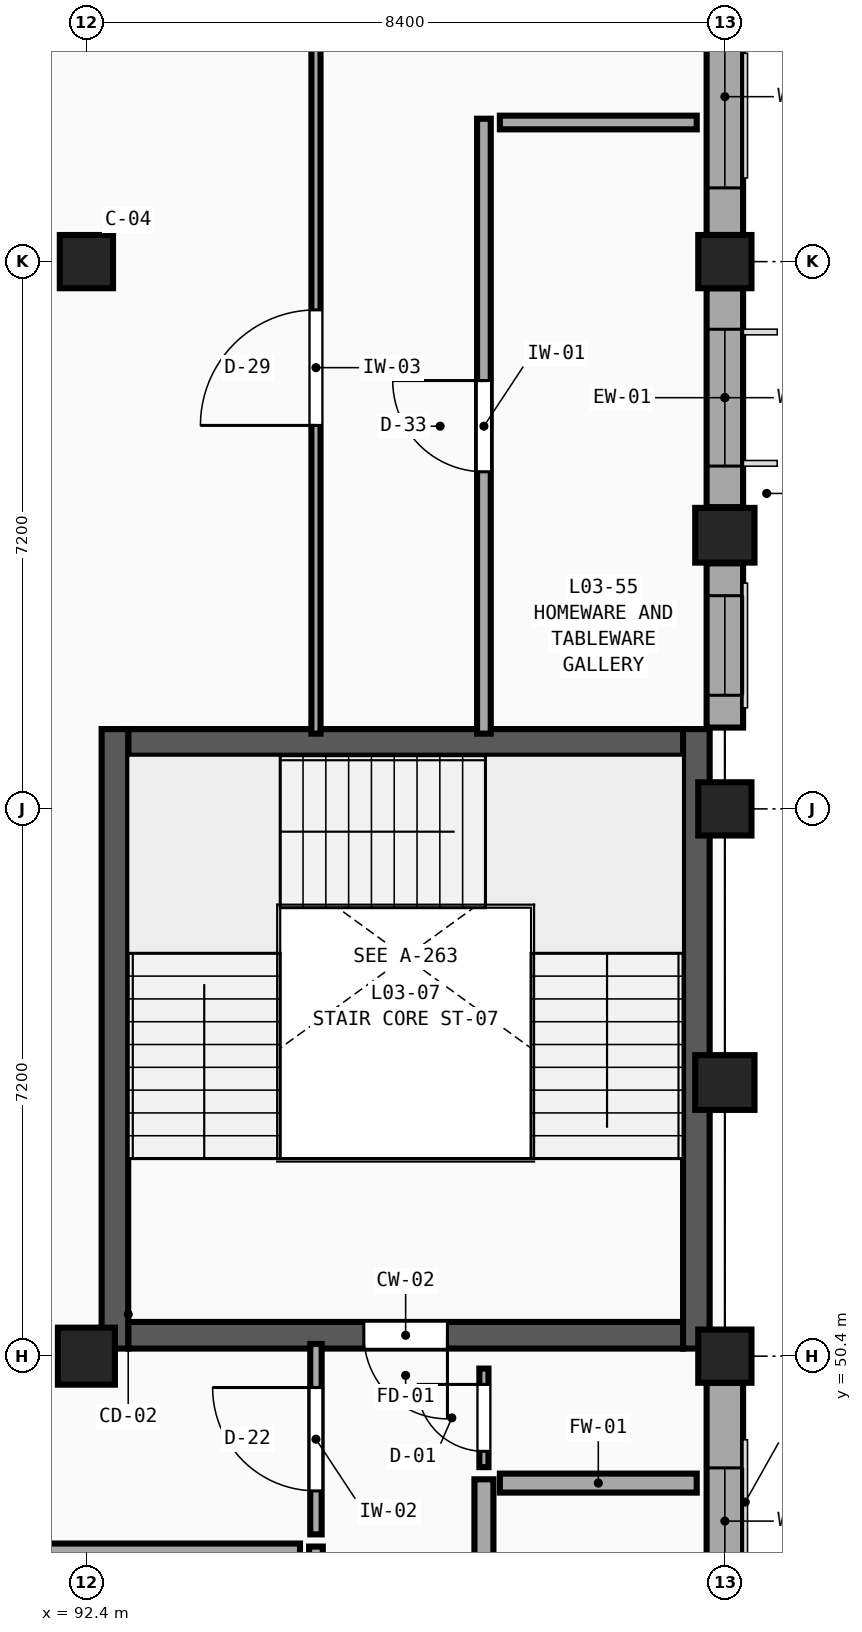
"""IFC4 building model, lengths in metres.
Left out: names, types, materials, properties, quantities, classifications, styles, units other than length and angle.
Written with IfcOpenShell. Run it as: python <this file> out.ifc"""

import sys

from ifc_helpers import new_model, si_unit, direction, frame, frame_2d, origin, origin_2d, place, context, subcontext, project, spatial, rectangle, circle, extrude, element, fill, save


model = new_model("IFC4")
c1 = context("Model", 3, precision=1e-05, world=origin(), true_north=direction((0.0, 1.0)))
c2 = subcontext(c1, "Body", "Model", "MODEL_VIEW")
j1 = project(units=[si_unit("LENGTHUNIT", "METRE"), si_unit("PLANEANGLEUNIT", "RADIAN")], contexts=[c1])
p1 = place(None, origin())
s1 = spatial("IfcSite", under=j1, at=p1, CompositionType="ELEMENT")
p2 = place(p1, origin())
s2 = spatial("IfcBuilding", under=s1, at=p2, CompositionType="ELEMENT")
p3 = place(p2, frame((0.0, 0.0, 14.4)))
s3 = spatial("IfcBuildingStorey", under=s2, at=p3, CompositionType="ELEMENT", Elevation=14.4)
for number, where, z_axis, x_axis in (
    (1, (92.4, 64.8, 0.0), (0.0, 0.0, 1.0), (1.0, 0.0, 0.0)),
    (2, (100.8, 50.4, 0.0), (0.0, 0.0, 1.0), (1.0, 0.0, 0.0)),
    (3, (100.8, 57.6, 0.0), (0.0, 0.0, 1.0), (1.0, 0.0, 0.0)),
    (4, (100.8, 64.8, 0.0), (0.0, 0.0, 1.0), (1.0, 0.0, 0.0)),
):
    element("IfcColumn", number, at=place(p3, frame(where, z_axis=z_axis, x_axis=x_axis)), inside=s3, PredefinedType="COLUMN", context=c2, shape_type="SweptSolid", body=[
        extrude(rectangle(XDim=0.7, YDim=0.7, at=origin_2d()), origin(), (0.0, 0.0, 1.0), 4.5),
    ])
for number, where, z_axis, x_axis in (
    (5, (100.8, 54.0, 0.0), (0.0, 0.0, 1.0), (1.0, 0.0, 0.0)),
    (6, (100.8, 61.2, 0.0), (0.0, 0.0, 1.0), (1.0, 0.0, 0.0)),
):
    element("IfcColumn", number, at=place(p3, frame(where, z_axis=z_axis, x_axis=x_axis)), inside=s3, PredefinedType="PILASTER", context=c2, shape_type="SweptSolid", body=[
        extrude(rectangle(XDim=0.78, YDim=0.72, at=origin_2d()), origin(), (0.0, 0.0, 1.0), 4.5),
    ])
p4 = place(p3, frame((92.4, 50.4, 0.0), z_axis=(0.0, 0.0, 1.0), x_axis=(1.0, 0.0, 0.0)))
e7 = element("IfcColumn", 7, at=p4, inside=s3, PredefinedType="COLUMN", context=c2, shape_type="SweptSolid", body=[
    extrude(circle(Radius=0.375, at=origin_2d()), origin(), (0.0, 0.0, 1.0), 4.5),
])
p5 = place(p3, frame((100.8, 50.05, 0.0), z_axis=(0.0, 0.0, 1.0), x_axis=(0.0, -1.0, 0.0)))
e8 = element("IfcWall", 8, at=p5, inside=s3, PredefinedType="SOLIDWALL", context=c2, shape_type="SweptSolid", body=[
    extrude(rectangle(XDim=6.5, YDim=0.48, at=frame_2d((3.25, 0.0))), origin(), (0.0, 0.0, 1.0), 3.63),
])
p6 = place(p5, frame((1.12, 0.0, 0.75)))
e9 = element("IfcOpeningElement", 9, at=p6, cuts=e8, PredefinedType="OPENING", context=c2, shape_type="SweptSolid", body=[
    extrude(rectangle(XDim=1.4, YDim=2.08, at=frame_2d((0.7, 1.04))), frame((0.0, 0.26, 0.0), z_axis=(0.0, -1.0, 0.0), x_axis=(1.0, 0.0, 0.0)), (0.0, 0.0, 1.0), 0.52),
])
p7 = place(p5, frame((3.88, 0.0, 0.75)))
e10 = element("IfcOpeningElement", 10, at=p7, cuts=e8, PredefinedType="OPENING", context=c2, shape_type="SweptSolid", body=[
    extrude(rectangle(XDim=1.6, YDim=2.08, at=frame_2d((0.8, 1.04))), frame((0.0, 0.26, 0.0), z_axis=(0.0, -1.0, 0.0), x_axis=(1.0, 0.0, 0.0)), (0.0, 0.0, 1.0), 0.52),
])
p8 = place(p3, frame((100.8, 64.45, 0.0), z_axis=(0.0, 0.0, 1.0), x_axis=(0.0, -1.0, 0.0)))
e11 = element("IfcWall", 11, at=p8, inside=s3, PredefinedType="SOLIDWALL", context=c2, shape_type="SweptSolid", body=[
    extrude(rectangle(XDim=2.88, YDim=0.48, at=frame_2d((1.44, 0.0))), origin(), (0.0, 0.0, 1.0), 3.63),
])
p9 = place(p8, frame((0.54, 0.0, 0.75)))
e12 = element("IfcOpeningElement", 12, at=p9, cuts=e11, PredefinedType="OPENING", context=c2, shape_type="SweptSolid", body=[
    extrude(rectangle(XDim=1.8, YDim=2.08, at=frame_2d((0.9, 1.04))), frame((0.0, 0.26, 0.0), z_axis=(0.0, -1.0, 0.0), x_axis=(1.0, 0.0, 0.0)), (0.0, 0.0, 1.0), 0.52),
])
p10 = place(p3, frame((100.8, 60.83, 0.0), z_axis=(0.0, 0.0, 1.0), x_axis=(0.0, -1.0, 0.0)))
e13 = element("IfcWall", 13, at=p10, inside=s3, PredefinedType="SOLIDWALL", context=c2, shape_type="SweptSolid", body=[
    extrude(rectangle(XDim=2.16, YDim=0.48, at=frame_2d((1.08, 0.0))), origin(), (0.0, 0.0, 1.0), 3.63),
])
p11 = place(p10, frame((0.425, 0.0, 0.75)))
e14 = element("IfcOpeningElement", 14, at=p11, cuts=e13, PredefinedType="OPENING", context=c2, shape_type="SweptSolid", body=[
    extrude(rectangle(XDim=1.31, YDim=2.08, at=frame_2d((0.655, 1.04))), frame((0.0, 0.26, 0.0), z_axis=(0.0, -1.0, 0.0), x_axis=(1.0, 0.0, 0.0)), (0.0, 0.0, 1.0), 0.52),
])
p12 = place(p3, frame((100.8, 71.65, 0.0), z_axis=(0.0, 0.0, 1.0), x_axis=(0.0, -1.0, 0.0)))
e15 = element("IfcWall", 15, at=p12, inside=s3, PredefinedType="SOLIDWALL", context=c2, shape_type="SweptSolid", body=[
    extrude(rectangle(XDim=6.5, YDim=0.48, at=frame_2d((3.25, 0.0))), origin(), (0.0, 0.0, 1.0), 3.63),
])
p13 = place(p12, frame((0.72, 0.0, 0.75)))
e16 = element("IfcOpeningElement", 16, at=p13, cuts=e15, PredefinedType="OPENING", context=c2, shape_type="SweptSolid", body=[
    extrude(rectangle(XDim=2.2, YDim=2.08, at=frame_2d((1.1, 1.04))), frame((0.0, 0.26, 0.0), z_axis=(0.0, -1.0, 0.0), x_axis=(1.0, 0.0, 0.0)), (0.0, 0.0, 1.0), 0.52),
])
p14 = place(p12, frame((3.48, 0.0, 0.75)))
e17 = element("IfcOpeningElement", 17, at=p14, cuts=e15, PredefinedType="OPENING", context=c2, shape_type="SweptSolid", body=[
    extrude(rectangle(XDim=2.4, YDim=2.08, at=frame_2d((1.2, 1.04))), frame((0.0, 0.26, 0.0), z_axis=(0.0, -1.0, 0.0), x_axis=(1.0, 0.0, 0.0)), (0.0, 0.0, 1.0), 0.52),
])
p15 = place(p3, frame((100.25, 50.675, 0.0), z_axis=(0.0, 0.0, 1.0), x_axis=(-1.0, 0.0, 0.0)))
e18 = element("IfcWall", 18, at=p15, inside=s3, PredefinedType="SHEAR", context=c2, shape_type="SweptSolid", body=[
    extrude(rectangle(XDim=7.3, YDim=0.35, at=frame_2d((3.65, 0.0))), origin(), (0.0, 0.0, 1.0), 4.5),
])
p16 = place(p15, frame((3.1, 0.0, 0.0)))
e19 = element("IfcOpeningElement", 19, at=p16, cuts=e18, PredefinedType="OPENING", context=c2, shape_type="SweptSolid", body=[
    extrude(rectangle(XDim=1.1, YDim=2.2, at=frame_2d((0.55, 1.1))), frame((0.0, 0.195, 0.0), z_axis=(0.0, -1.0, 0.0), x_axis=(1.0, 0.0, 0.0)), (0.0, 0.0, 1.0), 0.39),
])
p17 = place(p3, frame((92.95, 58.475, 0.0), z_axis=(0.0, 0.0, 1.0), x_axis=(1.0, 0.0, 0.0)))
e20 = element("IfcWall", 20, at=p17, inside=s3, PredefinedType="SHEAR", context=c2, shape_type="SweptSolid", body=[
    extrude(rectangle(XDim=7.3, YDim=0.35, at=frame_2d((3.65, 0.0))), origin(), (0.0, 0.0, 1.0), 4.5),
])
for number, where, z_axis, x_axis in (
    (21, (92.775, 58.65, 0.0), (0.0, 0.0, 1.0), (0.0, -1.0, 0.0)),
    (22, (100.425, 50.5, 0.0), (0.0, 0.0, 1.0), (0.0, 1.0, 0.0)),
):
    element("IfcWall", number, at=place(p3, frame(where, z_axis=z_axis, x_axis=x_axis)), inside=s3, PredefinedType="SHEAR", context=c2, shape_type="SweptSolid", body=[
        extrude(rectangle(XDim=8.15, YDim=0.35, at=frame_2d((4.075, 0.0))), origin(), (0.0, 0.0, 1.0), 4.5),
    ])
p18 = place(p3, frame((97.63, 36.37, 0.0), z_axis=(0.0, 0.0, 1.0), x_axis=(0.0, 1.0, 0.0)))
e23 = element("IfcWall", 23, at=p18, inside=s3, PredefinedType="SOLIDWALL", context=c2, shape_type="SweptSolid", body=[
    extrude(rectangle(XDim=12.41, YDim=0.25, at=frame_2d((6.205, 0.0))), origin(), (0.0, 0.0, 1.0), 4.18),
])
p19 = place(p18, frame((5.305, 0.0, 0.0)))
e24 = element("IfcOpeningElement", 24, at=p19, cuts=e23, PredefinedType="OPENING", context=c2, shape_type="SweptSolid", body=[
    extrude(rectangle(XDim=1.8, YDim=2.3, at=frame_2d((0.9, 1.15))), frame((0.0, 0.145, 0.0), z_axis=(0.0, -1.0, 0.0), x_axis=(1.0, 0.0, 0.0)), (0.0, 0.0, 1.0), 0.29),
])
p20 = place(p3, frame((95.42, 36.37, 0.0), z_axis=(0.0, 0.0, 1.0), x_axis=(0.0, 1.0, 0.0)))
e25 = element("IfcWall", 25, at=p20, inside=s3, PredefinedType="PARTITIONING", context=c2, shape_type="SweptSolid", body=[
    extrude(rectangle(XDim=11.525, YDim=0.18, at=frame_2d((5.762, 0.0))), origin(), (0.0, 0.0, 1.0), 4.18),
])
p21 = place(p20, frame((4.923, 0.0, 0.0)))
e26 = element("IfcOpeningElement", 26, at=p21, cuts=e25, PredefinedType="OPENING", context=c2, shape_type="SweptSolid", body=[
    extrude(rectangle(XDim=1.68, YDim=2.13, at=frame_2d((0.84, 1.065))), frame((0.0, 0.11, 0.0), z_axis=(0.0, -1.0, 0.0), x_axis=(1.0, 0.0, 0.0)), (0.0, 0.0, 1.0), 0.22),
])
p22 = place(p3, frame((95.42, 58.59, 0.0), z_axis=(0.0, 0.0, 1.0), x_axis=(0.0, 1.0, 0.0)))
e27 = element("IfcWall", 27, at=p22, inside=s3, PredefinedType="PARTITIONING", context=c2, shape_type="SweptSolid", body=[
    extrude(rectangle(XDim=9.63, YDim=0.12, at=frame_2d((4.815, 0.0))), origin(), (0.0, 0.0, 1.0), 4.18),
])
p23 = place(p22, frame((4.055, 0.0, 0.0)))
e28 = element("IfcOpeningElement", 28, at=p23, cuts=e27, PredefinedType="OPENING", context=c2, shape_type="SweptSolid", body=[
    extrude(rectangle(XDim=1.52, YDim=2.37, at=frame_2d((0.76, 1.185))), frame((0.0, 0.08, 0.0), z_axis=(0.0, -1.0, 0.0), x_axis=(1.0, 0.0, 0.0)), (0.0, 0.0, 1.0), 0.16),
])
p24 = place(p3, frame((97.63, 58.59, 0.0), z_axis=(0.0, 0.0, 1.0), x_axis=(0.0, 1.0, 0.0)))
e29 = element("IfcWall", 29, at=p24, inside=s3, PredefinedType="PARTITIONING", context=c2, shape_type="SweptSolid", body=[
    extrude(rectangle(XDim=8.09, YDim=0.18, at=frame_2d((4.045, 0.0))), origin(), (0.0, 0.0, 1.0), 4.18),
])
p25 = place(p24, frame((3.445, 0.0, 0.0)))
e30 = element("IfcOpeningElement", 30, at=p25, cuts=e29, PredefinedType="OPENING", context=c2, shape_type="SweptSolid", body=[
    extrude(rectangle(XDim=1.2, YDim=2.45, at=frame_2d((0.6, 1.225))), frame((0.0, 0.11, 0.0), z_axis=(0.0, -1.0, 0.0), x_axis=(1.0, 0.0, 0.0)), (0.0, 0.0, 1.0), 0.22),
])
p26 = place(p3, frame((95.42, 48.055, 0.0), z_axis=(0.0, 0.0, 1.0), x_axis=(0.0, 1.0, 0.0)))
e31 = element("IfcWall", 31, at=p26, inside=s3, PredefinedType="PARTITIONING", context=c2, shape_type="SweptSolid", body=[
    extrude(rectangle(XDim=2.505, YDim=0.15, at=frame_2d((1.252, 0.0))), origin(), (0.0, 0.0, 1.0), 4.18),
])
p27 = place(p26, frame((0.573, 0.0, 0.0)))
e32 = element("IfcOpeningElement", 32, at=p27, cuts=e31, PredefinedType="OPENING", context=c2, shape_type="SweptSolid", body=[
    extrude(rectangle(XDim=1.36, YDim=2.29, at=frame_2d((0.68, 1.145))), frame((0.0, 0.095, 0.0), z_axis=(0.0, -1.0, 0.0), x_axis=(1.0, 0.0, 0.0)), (0.0, 0.0, 1.0), 0.19),
])
p28 = place(p3, frame((97.63, 48.94, 0.0), z_axis=(0.0, 0.0, 1.0), x_axis=(0.0, 1.0, 0.0)))
e33 = element("IfcWall", 33, at=p28, inside=s3, PredefinedType="PARTITIONING", context=c2, shape_type="SweptSolid", body=[
    extrude(rectangle(XDim=1.296, YDim=0.12, at=frame_2d((0.648, 0.0))), origin(), (0.0, 0.0, 1.0), 4.18),
])
p29 = place(p28, frame((0.208, 0.0, 0.0)))
e34 = element("IfcOpeningElement", 34, at=p29, cuts=e33, PredefinedType="OPENING", context=c2, shape_type="SweptSolid", body=[
    extrude(rectangle(XDim=0.88, YDim=2.05, at=frame_2d((0.44, 1.025))), frame((0.0, 0.08, 0.0), z_axis=(0.0, -1.0, 0.0), x_axis=(1.0, 0.0, 0.0)), (0.0, 0.0, 1.0), 0.16),
])
p30 = place(p3, frame((85.979, 47.845, 0.0), z_axis=(0.0, 0.0, 1.0), x_axis=(1.0, 0.0, 0.0)))
e35 = element("IfcWall", 35, at=p30, inside=s3, PredefinedType="PARTITIONING", context=c2, shape_type="SweptSolid", body=[
    extrude(rectangle(XDim=9.231, YDim=0.18, at=frame_2d((4.615, 0.0))), origin(), (0.0, 0.0, 1.0), 4.18),
])
p31 = place(p3, frame((97.84, 48.73, 0.0), z_axis=(0.0, 0.0, 1.0), x_axis=(1.0, 0.0, 0.0)))
e36 = element("IfcWall", 36, at=p31, inside=s3, PredefinedType="SOLIDWALL", context=c2, shape_type="SweptSolid", body=[
    extrude(rectangle(XDim=2.59, YDim=0.25, at=frame_2d((1.295, 0.0))), origin(), (0.0, 0.0, 1.0), 4.18),
])
p32 = place(p3, frame((97.84, 66.63, 0.0), z_axis=(0.0, 0.0, 1.0), x_axis=(1.0, 0.0, 0.0)))
e37 = element("IfcWall", 37, at=p32, inside=s3, PredefinedType="PARTITIONING", context=c2, shape_type="SweptSolid", body=[
    extrude(rectangle(XDim=2.59, YDim=0.18, at=frame_2d((1.295, 0.0))), origin(), (0.0, 0.0, 1.0), 4.18),
])
p33 = place(p6, origin())
e38 = element("IfcWindow", 38, at=p33, inside=s3, PartitioningType="DOUBLE_PANEL_VERTICAL", PredefinedType="WINDOW", context=c2, shape_type="SweptSolid", body=[
    extrude(rectangle(XDim=1.4, YDim=2.08, at=frame_2d((0.7, 1.04))), frame((0.0, 0.03, 0.0), z_axis=(0.0, -1.0, 0.0), x_axis=(1.0, 0.0, 0.0)), (0.0, 0.0, 1.0), 0.06),
])
fill(e9, e38)
p34 = place(p9, origin())
e39 = element("IfcWindow", 39, at=p34, inside=s3, PartitioningType="DOUBLE_PANEL_VERTICAL", PredefinedType="WINDOW", context=c2, shape_type="SweptSolid", body=[
    extrude(rectangle(XDim=1.8, YDim=2.08, at=frame_2d((0.9, 1.04))), frame((0.0, 0.03, 0.0), z_axis=(0.0, -1.0, 0.0), x_axis=(1.0, 0.0, 0.0)), (0.0, 0.0, 1.0), 0.06),
])
fill(e12, e39)
p35 = place(p11, origin())
e40 = element("IfcWindow", 40, at=p35, inside=s3, PartitioningType="TRIPLE_PANEL_VERTICAL", PredefinedType="WINDOW", context=c2, shape_type="SweptSolid", body=[
    extrude(rectangle(XDim=1.31, YDim=2.08, at=frame_2d((0.655, 1.04))), frame((0.0, 0.03, 0.0), z_axis=(0.0, -1.0, 0.0), x_axis=(1.0, 0.0, 0.0)), (0.0, 0.0, 1.0), 0.06),
])
fill(e14, e40)
p36 = place(p14, origin())
e41 = element("IfcWindow", 41, at=p36, inside=s3, PartitioningType="TRIPLE_PANEL_VERTICAL", PredefinedType="WINDOW", context=c2, shape_type="SweptSolid", body=[
    extrude(rectangle(XDim=2.4, YDim=2.08, at=frame_2d((1.2, 1.04))), frame((0.0, 0.03, 0.0), z_axis=(0.0, -1.0, 0.0), x_axis=(1.0, 0.0, 0.0)), (0.0, 0.0, 1.0), 0.06),
])
fill(e17, e41)
p37 = place(p16, origin())
e42 = element("IfcDoor", 42, at=p37, inside=s3, OperationType="SINGLE_SWING_LEFT", PredefinedType="DOOR", context=c2, shape_type="SweptSolid", body=[
    extrude(rectangle(XDim=1.1, YDim=2.2, at=frame_2d((0.55, 1.1))), frame((0.0, 0.025, 0.0), z_axis=(0.0, -1.0, 0.0), x_axis=(1.0, 0.0, 0.0)), (0.0, 0.0, 1.0), 0.05),
])
fill(e19, e42)
p38 = place(p23, origin())
e43 = element("IfcDoor", 43, at=p38, inside=s3, OperationType="SINGLE_SWING_LEFT", PredefinedType="DOOR", context=c2, shape_type="SweptSolid", body=[
    extrude(rectangle(XDim=1.52, YDim=2.37, at=frame_2d((0.76, 1.185))), frame((0.0, 0.025, 0.0), z_axis=(0.0, -1.0, 0.0), x_axis=(1.0, 0.0, 0.0)), (0.0, 0.0, 1.0), 0.05),
])
fill(e28, e43)
p39 = place(p25, origin())
e44 = element("IfcDoor", 44, at=p39, inside=s3, OperationType="SINGLE_SWING_RIGHT", PredefinedType="DOOR", context=c2, shape_type="SweptSolid", body=[
    extrude(rectangle(XDim=1.2, YDim=2.45, at=frame_2d((0.6, 1.225))), frame((0.0, 0.025, 0.0), z_axis=(0.0, -1.0, 0.0), x_axis=(1.0, 0.0, 0.0)), (0.0, 0.0, 1.0), 0.05),
])
fill(e30, e44)
p40 = place(p27, origin())
e45 = element("IfcDoor", 45, at=p40, inside=s3, OperationType="SINGLE_SWING_RIGHT", PredefinedType="DOOR", context=c2, shape_type="SweptSolid", body=[
    extrude(rectangle(XDim=1.36, YDim=2.29, at=frame_2d((0.68, 1.145))), frame((0.0, 0.025, 0.0), z_axis=(0.0, -1.0, 0.0), x_axis=(1.0, 0.0, 0.0)), (0.0, 0.0, 1.0), 0.05),
])
fill(e32, e45)
p41 = place(p29, origin())
e46 = element("IfcDoor", 46, at=p41, inside=s3, OperationType="SINGLE_SWING_RIGHT", PredefinedType="DOOR", context=c2, shape_type="SweptSolid", body=[
    extrude(rectangle(XDim=0.88, YDim=2.05, at=frame_2d((0.44, 1.025))), frame((0.0, 0.025, 0.0), z_axis=(0.0, -1.0, 0.0), x_axis=(1.0, 0.0, 0.0)), (0.0, 0.0, 1.0), 0.05),
])
fill(e34, e46)
save(model, sys.argv[1])
